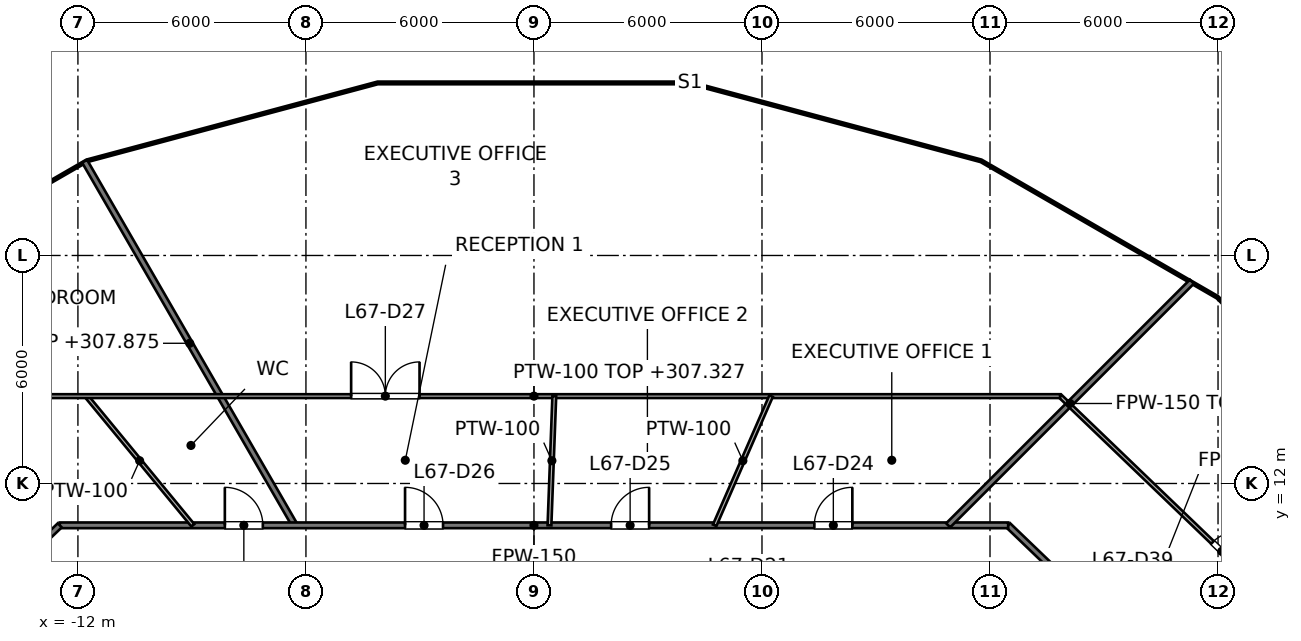
"""IFC4 building model, lengths in metres.
Left out: names, types, materials, properties, quantities, classifications, styles, units other than length and angle.
Written with IfcOpenShell. Run it as: python <this file> out.ifc"""

import sys

from ifc_helpers import new_model, si_unit, direction, frame, frame_2d, origin, place, context, subcontext, project, spatial, rectangle, extrude, element, fill, save


model = new_model("IFC4")
c1 = context("Model", 3, precision=1e-05, world=origin(), true_north=direction((0.0, 1.0)))
c2 = subcontext(c1, "Body", "Model", "MODEL_VIEW")
j1 = project(units=[si_unit("LENGTHUNIT", "METRE"), si_unit("PLANEANGLEUNIT", "RADIAN")], contexts=[c1])
p1 = place(None, origin())
s1 = spatial("IfcSite", under=j1, at=p1, CompositionType="ELEMENT")
p2 = place(p1, origin())
s2 = spatial("IfcBuilding", under=s1, at=p2, CompositionType="ELEMENT")
p3 = place(p2, frame((0.0, 0.0, 304.4)))
s3 = spatial("IfcBuildingStorey", under=s2, at=p3, CompositionType="ELEMENT", Elevation=304.4)
p4 = place(p3, frame((-11.824, 20.48, 0.0), z_axis=(0.0, 0.0, 1.0), x_axis=(0.500024263458, -0.866011394817, 0.0)))
e1 = element("IfcWall", 1, at=p4, inside=s3, PredefinedType="PARTITIONING", context=c2, shape_type="SweptSolid", body=[
    extrude(rectangle(XDim=11.063, YDim=0.15, at=frame_2d((5.532, 0.0))), origin(), (0.0, 0.0, 1.0), 3.475),
])
p5 = place(p3, frame((12.478, 10.899, 0.0), z_axis=(0.0, 0.0, 1.0), x_axis=(0.72127259513, -0.692651314526, 0.0)))
e2 = element("IfcWall", 2, at=p5, inside=s3, PredefinedType="PARTITIONING", context=c2, shape_type="SweptSolid", body=[
    extrude(rectangle(XDim=8.974, YDim=0.15, at=frame_2d((4.487, 0.0))), origin(), (0.0, 0.0, 1.0), 2.995),
])
p6 = place(p5, frame((4.036, 0.0, 0.0)))
e3 = element("IfcOpeningElement", 3, at=p6, cuts=e2, PredefinedType="OPENING", context=c2, shape_type="SweptSolid", body=[
    extrude(rectangle(XDim=1.0, YDim=2.1, at=frame_2d((0.5, 1.05))), frame((0.0, 0.075, 0.0), z_axis=(0.0, -1.0, 0.0), x_axis=(1.0, 0.0, 0.0)), (0.0, 0.0, 1.0), 0.15),
])
p7 = place(p3, frame((-12.478, 10.899, 0.0), z_axis=(0.0, 0.0, 1.0), x_axis=(1.0, 0.0, 0.0)))
e4 = element("IfcWall", 4, at=p7, inside=s3, PredefinedType="PARTITIONING", context=c2, shape_type="SweptSolid", body=[
    extrude(rectangle(XDim=24.956, YDim=0.15, at=frame_2d((12.478, 0.0))), origin(), (0.0, 0.0, 1.0), 2.927),
])
p8 = place(p7, frame((19.856, 0.0, 0.0)))
e5 = element("IfcOpeningElement", 5, at=p8, cuts=e4, PredefinedType="OPENING", context=c2, shape_type="SweptSolid", body=[
    extrude(rectangle(XDim=1.0, YDim=2.1, at=frame_2d((0.5, 1.05))), frame((0.0, 0.075, 0.0), z_axis=(0.0, -1.0, 0.0), x_axis=(1.0, 0.0, 0.0)), (0.0, 0.0, 1.0), 0.15),
])
p9 = place(p7, frame((14.508, 0.0, 0.0)))
e6 = element("IfcOpeningElement", 6, at=p9, cuts=e4, PredefinedType="OPENING", context=c2, shape_type="SweptSolid", body=[
    extrude(rectangle(XDim=1.0, YDim=2.1, at=frame_2d((0.5, 1.05))), frame((0.0, 0.075, 0.0), z_axis=(0.0, -1.0, 0.0), x_axis=(1.0, 0.0, 0.0)), (0.0, 0.0, 1.0), 0.15),
])
p10 = place(p7, frame((9.086, 0.0, 0.0)))
e7 = element("IfcOpeningElement", 7, at=p10, cuts=e4, PredefinedType="OPENING", context=c2, shape_type="SweptSolid", body=[
    extrude(rectangle(XDim=1.0, YDim=2.1, at=frame_2d((0.5, 1.05))), frame((0.0, 0.075, 0.0), z_axis=(0.0, -1.0, 0.0), x_axis=(1.0, 0.0, 0.0)), (0.0, 0.0, 1.0), 0.15),
])
p11 = place(p7, frame((4.344, 0.0, 0.0)))
e8 = element("IfcOpeningElement", 8, at=p11, cuts=e4, PredefinedType="OPENING", context=c2, shape_type="SweptSolid", body=[
    extrude(rectangle(XDim=1.0, YDim=2.1, at=frame_2d((0.5, 1.05))), frame((0.0, 0.075, 0.0), z_axis=(0.0, -1.0, 0.0), x_axis=(1.0, 0.0, 0.0)), (0.0, 0.0, 1.0), 0.15),
])
p12 = place(p3, frame((-18.95, 4.683, 0.0), z_axis=(0.0, 0.0, 1.0), x_axis=(0.721259541977, 0.692664906797, 0.0)))
e9 = element("IfcWall", 9, at=p12, inside=s3, PredefinedType="PARTITIONING", context=c2, shape_type="SweptSolid", body=[
    extrude(rectangle(XDim=8.973, YDim=0.15, at=frame_2d((4.487, 0.0))), origin(), (0.0, 0.0, 1.0), 2.995),
])
p13 = place(p12, frame((3.937, 0.0, 0.0)))
e10 = element("IfcOpeningElement", 10, at=p13, cuts=e9, PredefinedType="OPENING", context=c2, shape_type="SweptSolid", body=[
    extrude(rectangle(XDim=1.0, YDim=2.1, at=frame_2d((0.5, 1.05))), frame((0.0, 0.075, 0.0), z_axis=(0.0, -1.0, 0.0), x_axis=(1.0, 0.0, 0.0)), (0.0, 0.0, 1.0), 0.15),
])
p14 = place(p3, frame((10.899, 10.899, 0.0), z_axis=(0.0, 0.0, 1.0), x_axis=(0.707106781187, 0.707106781187, 0.0)))
e11 = element("IfcWall", 11, at=p14, inside=s3, PredefinedType="PARTITIONING", context=c2, shape_type="SweptSolid", body=[
    extrude(rectangle(XDim=9.068, YDim=0.15, at=frame_2d((4.534, 0.0))), origin(), (0.0, 0.0, 1.0), 2.995),
])
p15 = place(p3, frame((-11.776, 14.299, 0.0), z_axis=(0.0, 0.0, 1.0), x_axis=(0.63566450838, -0.771965434968, 0.0)))
e12 = element("IfcWall", 12, at=p15, inside=s3, PredefinedType="PARTITIONING", context=c2, shape_type="SweptSolid", body=[
    extrude(rectangle(XDim=4.405, YDim=0.1, at=frame_2d((2.202, 0.0))), origin(), (0.0, 0.0, 1.0), 3.85),
])
p16 = place(p3, frame((13.846, 14.299, 0.0), z_axis=(0.0, 0.0, 1.0), x_axis=(0.72117874289, -0.692749031615, 0.0)))
e13 = element("IfcWall", 13, at=p16, inside=s3, PredefinedType="PARTITIONING", context=c2, shape_type="SweptSolid", body=[
    extrude(rectangle(XDim=11.791, YDim=0.1, at=frame_2d((5.896, 0.0))), origin(), (0.0, 0.0, 1.0), 2.995),
])
p17 = place(p16, frame((5.557, 0.0, 0.0)))
e14 = element("IfcOpeningElement", 14, at=p17, cuts=e13, PredefinedType="OPENING", context=c2, shape_type="SweptSolid", body=[
    extrude(rectangle(XDim=0.9, YDim=2.1, at=frame_2d((0.45, 1.05))), frame((0.0, 0.05, 0.0), z_axis=(0.0, -1.0, 0.0), x_axis=(1.0, 0.0, 0.0)), (0.0, 0.0, 1.0), 0.1),
])
p18 = place(p3, frame((-13.846, 14.299, 0.0), z_axis=(0.0, 0.0, 1.0), x_axis=(1.0, 0.0, 0.0)))
e15 = element("IfcWall", 15, at=p18, inside=s3, PredefinedType="PARTITIONING", context=c2, shape_type="SweptSolid", body=[
    extrude(rectangle(XDim=27.692, YDim=0.1, at=frame_2d((13.846, 0.0))), origin(), (0.0, 0.0, 1.0), 2.927),
])
p19 = place(p18, frame((9.035, 0.0, 0.0)))
e16 = element("IfcOpeningElement", 16, at=p19, cuts=e15, PredefinedType="OPENING", context=c2, shape_type="SweptSolid", body=[
    extrude(rectangle(XDim=1.8, YDim=2.1, at=frame_2d((0.9, 1.05))), frame((0.0, 0.05, 0.0), z_axis=(0.0, -1.0, 0.0), x_axis=(1.0, 0.0, 0.0)), (0.0, 0.0, 1.0), 0.1),
])
p20 = place(p3, frame((4.755, 10.899, 0.0), z_axis=(0.0, 0.0, 1.0), x_axis=(0.400041949281, 0.916496829681, 0.0)))
e17 = element("IfcWall", 17, at=p20, inside=s3, PredefinedType="PARTITIONING", context=c2, shape_type="SweptSolid", body=[
    extrude(rectangle(XDim=3.71, YDim=0.1, at=frame_2d((1.855, 0.0))), origin(), (0.0, 0.0, 1.0), 3.85),
])
p21 = place(p3, frame((0.408, 10.899, 0.0), z_axis=(0.0, 0.0, 1.0), x_axis=(0.037311546962, 0.999303681802, 0.0)))
e18 = element("IfcWall", 18, at=p21, inside=s3, PredefinedType="PARTITIONING", context=c2, shape_type="SweptSolid", body=[
    extrude(rectangle(XDim=3.403, YDim=0.1, at=frame_2d((1.701, 0.0))), origin(), (0.0, 0.0, 1.0), 3.85),
])
p22 = place(p8, origin())
e19 = element("IfcDoor", 19, at=p22, inside=s3, OperationType="SINGLE_SWING_RIGHT", PredefinedType="DOOR", context=c2, shape_type="SweptSolid", body=[
    extrude(rectangle(XDim=1.0, YDim=2.1, at=frame_2d((0.5, 1.05))), frame((0.0, 0.025, 0.0), z_axis=(0.0, -1.0, 0.0), x_axis=(1.0, 0.0, 0.0)), (0.0, 0.0, 1.0), 0.05),
])
fill(e5, e19)
p23 = place(p9, origin())
e20 = element("IfcDoor", 20, at=p23, inside=s3, OperationType="SINGLE_SWING_RIGHT", PredefinedType="DOOR", context=c2, shape_type="SweptSolid", body=[
    extrude(rectangle(XDim=1.0, YDim=2.1, at=frame_2d((0.5, 1.05))), frame((0.0, 0.025, 0.0), z_axis=(0.0, -1.0, 0.0), x_axis=(1.0, 0.0, 0.0)), (0.0, 0.0, 1.0), 0.05),
])
fill(e6, e20)
p24 = place(p10, origin())
e21 = element("IfcDoor", 21, at=p24, inside=s3, OperationType="SINGLE_SWING_LEFT", PredefinedType="DOOR", context=c2, shape_type="SweptSolid", body=[
    extrude(rectangle(XDim=1.0, YDim=2.1, at=frame_2d((0.5, 1.05))), frame((0.0, 0.025, 0.0), z_axis=(0.0, -1.0, 0.0), x_axis=(1.0, 0.0, 0.0)), (0.0, 0.0, 1.0), 0.05),
])
fill(e7, e21)
p25 = place(p19, origin())
e22 = element("IfcDoor", 22, at=p25, inside=s3, OperationType="DOUBLE_DOOR_SINGLE_SWING", PredefinedType="DOOR", context=c2, shape_type="SweptSolid", body=[
    extrude(rectangle(XDim=1.8, YDim=2.1, at=frame_2d((0.9, 1.05))), frame((0.0, 0.025, 0.0), z_axis=(0.0, -1.0, 0.0), x_axis=(1.0, 0.0, 0.0)), (0.0, 0.0, 1.0), 0.05),
])
fill(e16, e22)
p26 = place(p11, origin())
e23 = element("IfcDoor", 23, at=p26, inside=s3, OperationType="SINGLE_SWING_LEFT", PredefinedType="DOOR", context=c2, shape_type="SweptSolid", body=[
    extrude(rectangle(XDim=1.0, YDim=2.1, at=frame_2d((0.5, 1.05))), frame((0.0, 0.025, 0.0), z_axis=(0.0, -1.0, 0.0), x_axis=(1.0, 0.0, 0.0)), (0.0, 0.0, 1.0), 0.05),
])
fill(e8, e23)
p27 = place(p17, origin())
e24 = element("IfcDoor", 24, at=p27, inside=s3, OperationType="SINGLE_SWING_RIGHT", PredefinedType="DOOR", context=c2, shape_type="SweptSolid", body=[
    extrude(rectangle(XDim=0.9, YDim=2.1, at=frame_2d((0.45, 1.05))), frame((0.0, 0.025, 0.0), z_axis=(0.0, -1.0, 0.0), x_axis=(1.0, 0.0, 0.0)), (0.0, 0.0, 1.0), 0.05),
])
fill(e14, e24)
save(model, sys.argv[1])
